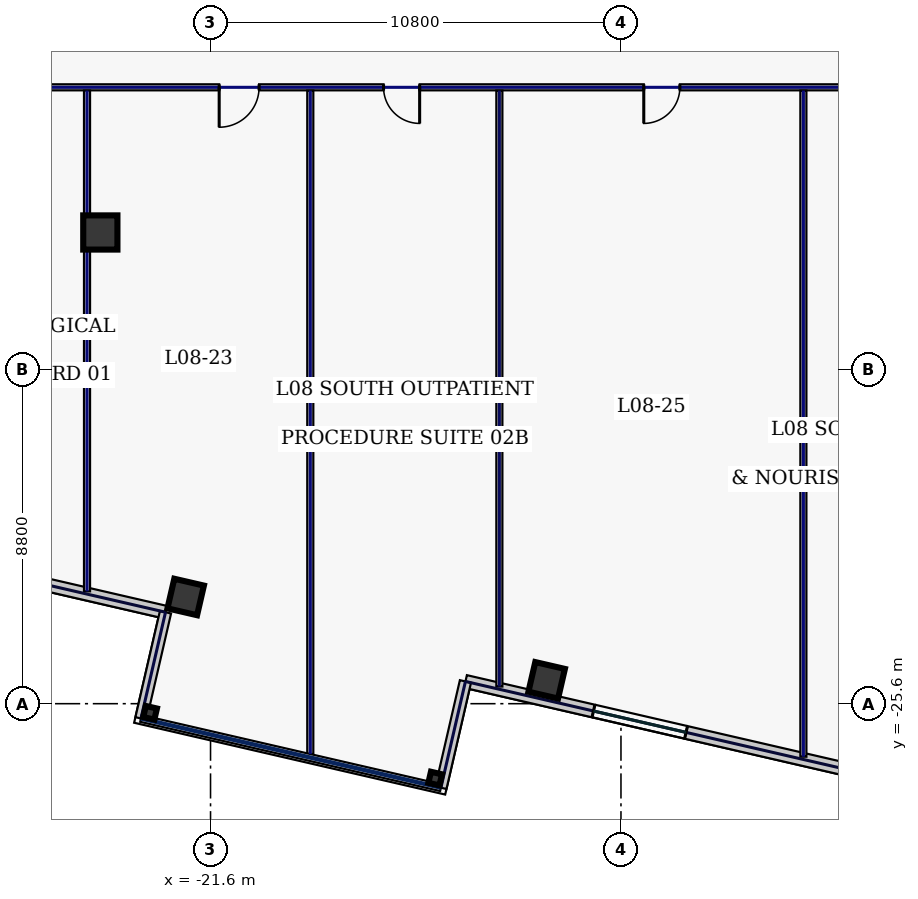
"""IFC4 building model, lengths in metres.
Left out: names, types, materials, properties, quantities, classifications, styles, units other than length and angle.
Written with IfcOpenShell. Run it as: python <this file> out.ifc"""

import sys

from ifc_helpers import new_model, si_unit, direction, frame, frame_2d, origin, origin_2d, place, context, subcontext, project, spatial, rectangle, hollow_rectangle, extrude, element, fill, save


model = new_model("IFC4")
c1 = context("Model", 3, precision=1e-05, world=origin(), true_north=direction((0.0, 1.0)))
c2 = subcontext(c1, "Body", "Model", "MODEL_VIEW")
j1 = project(units=[si_unit("LENGTHUNIT", "METRE"), si_unit("PLANEANGLEUNIT", "RADIAN")], contexts=[c1])
p1 = place(None, origin())
s1 = spatial("IfcSite", under=j1, at=p1, CompositionType="ELEMENT")
p2 = place(p1, origin())
s2 = spatial("IfcBuilding", under=s1, at=p2, CompositionType="ELEMENT")
p3 = place(p2, frame((0.0, 0.0, 43.4)))
s3 = spatial("IfcBuildingStorey", under=s2, at=p3, CompositionType="ELEMENT", Elevation=43.4)
p4 = place(p3, frame((-24.5, -13.2, 0.0), z_axis=(0.0, 0.0, 1.0), x_axis=(1.0, 0.0, 0.0)))
e1 = element("IfcColumn", 1, at=p4, inside=s3, PredefinedType="COLUMN", context=c2, shape_type="SweptSolid", body=[
    extrude(hollow_rectangle(XDim=0.9, YDim=0.9, WallThickness=0.04, at=origin_2d()), origin(), (0.0, 0.0, 1.0), 3.74),
])
for number, where, z_axis, x_axis in (
    (2, (-22.254, -22.792, 0.0), (0.0, 0.0, 1.0), (0.974, -0.225, 0.0)),
    (3, (-12.755, -24.985, 0.0), (0.0, 0.0, 1.0), (0.974, -0.225, 0.0)),
):
    element("IfcColumn", number, at=place(p3, frame(where, z_axis=z_axis, x_axis=x_axis)), inside=s3, PredefinedType="COLUMN", context=c2, shape_type="SweptSolid", body=[
        extrude(hollow_rectangle(XDim=0.8, YDim=0.8, WallThickness=0.036, at=origin_2d()), origin(), (0.0, 0.0, 1.0), 3.74),
    ])
for number, where, z_axis, x_axis in (
    (4, (-23.19, -25.839, 0.0), (0.0, 0.0, 1.0), (0.974, -0.225, 0.0)),
    (5, (-15.688, -27.571, 0.0), (0.0, 0.0, 1.0), (0.974, -0.225, 0.0)),
):
    element("IfcColumn", number, at=place(p3, frame(where, z_axis=z_axis, x_axis=x_axis)), inside=s3, PredefinedType="COLUMN", context=c2, shape_type="SweptSolid", body=[
        extrude(hollow_rectangle(XDim=0.3, YDim=0.3, WallThickness=0.016, at=origin_2d()), origin(), (0.0, 0.0, 1.0), 3.74),
    ])
p5 = place(p3, frame((-42.029, -18.75, 0.0), z_axis=(0.0, 0.0, 1.0), x_axis=(0.974371399361, -0.224945273581, 0.0)))
e6 = element("IfcWall", 6, at=p5, inside=s3, PredefinedType="STANDARD", context=c2, shape_type="SweptSolid", body=[
    extrude(rectangle(XDim=19.75, YDim=0.34, at=frame_2d((9.875, 0.0))), origin(), (0.0, 0.0, 1.0), 3.74),
])
p6 = place(p5, frame((2.062, 0.0, 0.72)))
e7 = element("IfcOpeningElement", 7, at=p6, cuts=e6, PredefinedType="OPENING", context=c2, shape_type="SweptSolid", body=[
    extrude(rectangle(XDim=2.5, YDim=2.15, at=frame_2d((1.25, 1.075))), frame((0.0, 0.18, 0.0), z_axis=(0.0, -1.0, 0.0), x_axis=(1.0, 0.0, 0.0)), (0.0, 0.0, 1.0), 0.36),
])
p7 = place(p5, frame((6.546, 0.0, 0.72)))
e8 = element("IfcOpeningElement", 8, at=p7, cuts=e6, PredefinedType="OPENING", context=c2, shape_type="SweptSolid", body=[
    extrude(rectangle(XDim=2.5, YDim=2.15, at=frame_2d((1.25, 1.075))), frame((0.0, 0.18, 0.0), z_axis=(0.0, -1.0, 0.0), x_axis=(1.0, 0.0, 0.0)), (0.0, 0.0, 1.0), 0.36),
])
p8 = place(p5, frame((13.461, 0.0, 0.72)))
e9 = element("IfcOpeningElement", 9, at=p8, cuts=e6, PredefinedType="OPENING", context=c2, shape_type="SweptSolid", body=[
    extrude(rectangle(XDim=0.85, YDim=1.85, at=frame_2d((0.425, 0.925))), frame((0.0, 0.18, 0.0), z_axis=(0.0, -1.0, 0.0), x_axis=(1.0, 0.0, 0.0)), (0.0, 0.0, 1.0), 0.36),
])
p9 = place(p3, frame((-14.892, -25.015, 0.0), z_axis=(0.0, 0.0, 1.0), x_axis=(0.974372775, -0.224939314791, 0.0)))
e10 = element("IfcWall", 10, at=p9, inside=s3, PredefinedType="STANDARD", context=c2, shape_type="SweptSolid", body=[
    extrude(rectangle(XDim=14.299, YDim=0.34, at=frame_2d((7.149, 0.0))), origin(), (0.0, 0.0, 1.0), 3.74),
])
p10 = place(p9, frame((3.458, 0.0, 0.72)))
e11 = element("IfcOpeningElement", 11, at=p10, cuts=e10, PredefinedType="OPENING", context=c2, shape_type="SweptSolid", body=[
    extrude(rectangle(XDim=2.5, YDim=2.15, at=frame_2d((1.25, 1.075))), frame((0.0, 0.18, 0.0), z_axis=(0.0, -1.0, 0.0), x_axis=(1.0, 0.0, 0.0)), (0.0, 0.0, 1.0), 0.36),
])
p11 = place(p3, frame((-22.785, -23.193, 0.0), z_axis=(0.0, 0.0, 1.0), x_axis=(-0.224983749842, -0.974362515857, 0.0)))
e12 = element("IfcWall", 12, at=p11, inside=s3, PredefinedType="STANDARD", context=c2, shape_type="SweptSolid", body=[
    extrude(rectangle(XDim=2.87, YDim=0.3, at=frame_2d((1.435, 0.0))), origin(), (0.0, 0.0, 1.0), 1.535),
])
p12 = place(p3, frame((-14.892, -25.015, 0.0), z_axis=(0.0, 0.0, 1.0), x_axis=(-0.225002397841, -0.97435820978, 0.0)))
e13 = element("IfcWall", 13, at=p12, inside=s3, PredefinedType="STANDARD", context=c2, shape_type="SweptSolid", body=[
    extrude(rectangle(XDim=2.87, YDim=0.3, at=frame_2d((1.435, 0.0))), origin(), (0.0, 0.0, 1.0), 1.535),
])
p13 = place(p3, frame((29.415, -9.38, 0.0), z_axis=(0.0, 0.0, 1.0), x_axis=(-1.0, 0.0, 0.0)))
e14 = element("IfcWall", 14, at=p13, inside=s3, PredefinedType="PARTITIONING", context=c2, shape_type="SweptSolid", body=[
    extrude(rectangle(XDim=58.83, YDim=0.16, at=frame_2d((29.415, 0.0))), origin(), (0.0, 0.0, 1.0), 3.74),
])
p14 = place(p13, frame((55.831, 0.0, 0.0)))
e15 = element("IfcOpeningElement", 15, at=p14, cuts=e14, PredefinedType="OPENING", context=c2, shape_type="SweptSolid", body=[
    extrude(rectangle(XDim=1.3, YDim=2.2, at=frame_2d((0.65, 1.1))), frame((0.0, 0.09, 0.0), z_axis=(0.0, -1.0, 0.0), x_axis=(1.0, 0.0, 0.0)), (0.0, 0.0, 1.0), 0.18),
])
p15 = place(p13, frame((49.738, 0.0, 0.0)))
e16 = element("IfcOpeningElement", 16, at=p15, cuts=e14, PredefinedType="OPENING", context=c2, shape_type="SweptSolid", body=[
    extrude(rectangle(XDim=1.05, YDim=2.2, at=frame_2d((0.525, 1.1))), frame((0.0, 0.09, 0.0), z_axis=(0.0, -1.0, 0.0), x_axis=(1.0, 0.0, 0.0)), (0.0, 0.0, 1.0), 0.18),
])
p16 = place(p13, frame((45.512, 0.0, 0.0)))
e17 = element("IfcOpeningElement", 17, at=p16, cuts=e14, PredefinedType="OPENING", context=c2, shape_type="SweptSolid", body=[
    extrude(rectangle(XDim=0.95, YDim=2.2, at=frame_2d((0.475, 1.1))), frame((0.0, 0.09, 0.0), z_axis=(0.0, -1.0, 0.0), x_axis=(1.0, 0.0, 0.0)), (0.0, 0.0, 1.0), 0.18),
])
p17 = place(p13, frame((38.665, 0.0, 0.0)))
e18 = element("IfcOpeningElement", 18, at=p17, cuts=e14, PredefinedType="OPENING", context=c2, shape_type="SweptSolid", body=[
    extrude(rectangle(XDim=0.95, YDim=2.2, at=frame_2d((0.475, 1.1))), frame((0.0, 0.09, 0.0), z_axis=(0.0, -1.0, 0.0), x_axis=(1.0, 0.0, 0.0)), (0.0, 0.0, 1.0), 0.18),
])
p18 = place(p13, frame((32.575, 0.0, 0.0)))
e19 = element("IfcOpeningElement", 19, at=p18, cuts=e14, PredefinedType="OPENING", context=c2, shape_type="SweptSolid", body=[
    extrude(rectangle(XDim=0.95, YDim=2.2, at=frame_2d((0.475, 1.1))), frame((0.0, 0.09, 0.0), z_axis=(0.0, -1.0, 0.0), x_axis=(1.0, 0.0, 0.0)), (0.0, 0.0, 1.0), 0.18),
])
p19 = place(p13, frame((28.125, 0.0, 0.0)))
e20 = element("IfcOpeningElement", 20, at=p19, cuts=e14, PredefinedType="OPENING", context=c2, shape_type="SweptSolid", body=[
    extrude(rectangle(XDim=0.95, YDim=2.2, at=frame_2d((0.475, 1.1))), frame((0.0, 0.09, 0.0), z_axis=(0.0, -1.0, 0.0), x_axis=(1.0, 0.0, 0.0)), (0.0, 0.0, 1.0), 0.18),
])
p20 = place(p13, frame((23.5, 0.0, 0.0)))
e21 = element("IfcOpeningElement", 21, at=p20, cuts=e14, PredefinedType="OPENING", context=c2, shape_type="SweptSolid", body=[
    extrude(rectangle(XDim=1.3, YDim=2.2, at=frame_2d((0.65, 1.1))), frame((0.0, 0.09, 0.0), z_axis=(0.0, -1.0, 0.0), x_axis=(1.0, 0.0, 0.0)), (0.0, 0.0, 1.0), 0.18),
])
p21 = place(p13, frame((19.05, 0.0, 0.0)))
e22 = element("IfcOpeningElement", 22, at=p21, cuts=e14, PredefinedType="OPENING", context=c2, shape_type="SweptSolid", body=[
    extrude(rectangle(XDim=1.45, YDim=2.2, at=frame_2d((0.725, 1.1))), frame((0.0, 0.09, 0.0), z_axis=(0.0, -1.0, 0.0), x_axis=(1.0, 0.0, 0.0)), (0.0, 0.0, 1.0), 0.18),
])
p22 = place(p13, frame((14.8, 0.0, 0.0)))
e23 = element("IfcOpeningElement", 23, at=p22, cuts=e14, PredefinedType="OPENING", context=c2, shape_type="SweptSolid", body=[
    extrude(rectangle(XDim=1.3, YDim=2.2, at=frame_2d((0.65, 1.1))), frame((0.0, 0.09, 0.0), z_axis=(0.0, -1.0, 0.0), x_axis=(1.0, 0.0, 0.0)), (0.0, 0.0, 1.0), 0.18),
])
p23 = place(p13, frame((10.925, 0.0, 0.0)))
e24 = element("IfcOpeningElement", 24, at=p23, cuts=e14, PredefinedType="OPENING", context=c2, shape_type="SweptSolid", body=[
    extrude(rectangle(XDim=0.95, YDim=2.2, at=frame_2d((0.475, 1.1))), frame((0.0, 0.09, 0.0), z_axis=(0.0, -1.0, 0.0), x_axis=(1.0, 0.0, 0.0)), (0.0, 0.0, 1.0), 0.18),
])
p24 = place(p13, frame((6.65, 0.0, 0.0)))
e25 = element("IfcOpeningElement", 25, at=p24, cuts=e14, PredefinedType="OPENING", context=c2, shape_type="SweptSolid", body=[
    extrude(rectangle(XDim=0.95, YDim=2.2, at=frame_2d((0.475, 1.1))), frame((0.0, 0.09, 0.0), z_axis=(0.0, -1.0, 0.0), x_axis=(1.0, 0.0, 0.0)), (0.0, 0.0, 1.0), 0.18),
])
p25 = place(p13, frame((2.044, 0.0, 0.0)))
e26 = element("IfcOpeningElement", 26, at=p25, cuts=e14, PredefinedType="OPENING", context=c2, shape_type="SweptSolid", body=[
    extrude(rectangle(XDim=1.05, YDim=2.2, at=frame_2d((0.525, 1.1))), frame((0.0, 0.09, 0.0), z_axis=(0.0, -1.0, 0.0), x_axis=(1.0, 0.0, 0.0)), (0.0, 0.0, 1.0), 0.18),
])
p26 = place(p3, frame((-24.85, -22.644, 0.0), z_axis=(0.0, 0.0, 1.0), x_axis=(0.0, 1.0, 0.0)))
e27 = element("IfcWall", 27, at=p26, inside=s3, PredefinedType="PARTITIONING", context=c2, shape_type="SweptSolid", body=[
    extrude(rectangle(XDim=13.179, YDim=0.16, at=frame_2d((6.589, 0.0))), origin(), (0.0, 0.0, 1.0), 3.74),
])
p27 = place(p3, frame((-14.0, -25.149, 0.0), z_axis=(0.0, 0.0, 1.0), x_axis=(0.0, 1.0, 0.0)))
e28 = element("IfcWall", 28, at=p27, inside=s3, PredefinedType="PARTITIONING", context=c2, shape_type="SweptSolid", body=[
    extrude(rectangle(XDim=15.684, YDim=0.16, at=frame_2d((7.842, 0.0))), origin(), (0.0, 0.0, 1.0), 1.535),
])
p28 = place(p3, frame((-6.0, -26.996, 0.0), z_axis=(0.0, 0.0, 1.0), x_axis=(0.0, 1.0, 0.0)))
e29 = element("IfcWall", 29, at=p28, inside=s3, PredefinedType="PARTITIONING", context=c2, shape_type="SweptSolid", body=[
    extrude(rectangle(XDim=17.531, YDim=0.16, at=frame_2d((8.765, 0.0))), origin(), (0.0, 0.0, 1.0), 3.74),
])
p29 = place(p3, frame((-18.975, -26.925, 0.0), z_axis=(0.0, 0.0, 1.0), x_axis=(0.0, 1.0, 0.0)))
e30 = element("IfcWall", 30, at=p29, inside=s3, PredefinedType="PARTITIONING", context=c2, shape_type="SweptSolid", body=[
    extrude(rectangle(XDim=17.46, YDim=0.16, at=frame_2d((8.73, 0.0))), origin(), (0.0, 0.0, 1.0), 3.74),
])
p30 = place(p10, origin())
e31 = element("IfcWindow", 31, at=p30, inside=s3, PartitioningType="SINGLE_PANEL", PredefinedType="WINDOW", context=c2, shape_type="SweptSolid", body=[
    extrude(rectangle(XDim=2.5, YDim=2.15, at=frame_2d((1.25, 1.075))), frame((0.0, 0.03, 0.0), z_axis=(0.0, -1.0, 0.0), x_axis=(1.0, 0.0, 0.0)), (0.0, 0.0, 1.0), 0.06),
])
fill(e11, e31)
p31 = place(p15, origin())
e32 = element("IfcDoor", 32, at=p31, inside=s3, OperationType="SINGLE_SWING_RIGHT", PredefinedType="DOOR", context=c2, shape_type="SweptSolid", body=[
    extrude(rectangle(XDim=1.05, YDim=2.2, at=frame_2d((0.525, 1.1))), frame((0.0, 0.025, 0.0), z_axis=(0.0, -1.0, 0.0), x_axis=(1.0, 0.0, 0.0)), (0.0, 0.0, 1.0), 0.05),
])
fill(e16, e32)
p32 = place(p16, origin())
e33 = element("IfcDoor", 33, at=p32, inside=s3, OperationType="SINGLE_SWING_LEFT", PredefinedType="DOOR", context=c2, shape_type="SweptSolid", body=[
    extrude(rectangle(XDim=0.95, YDim=2.2, at=frame_2d((0.475, 1.1))), frame((0.0, 0.025, 0.0), z_axis=(0.0, -1.0, 0.0), x_axis=(1.0, 0.0, 0.0)), (0.0, 0.0, 1.0), 0.05),
])
fill(e17, e33)
p33 = place(p17, origin())
e34 = element("IfcDoor", 34, at=p33, inside=s3, OperationType="SINGLE_SWING_RIGHT", PredefinedType="DOOR", context=c2, shape_type="SweptSolid", body=[
    extrude(rectangle(XDim=0.95, YDim=2.2, at=frame_2d((0.475, 1.1))), frame((0.0, 0.025, 0.0), z_axis=(0.0, -1.0, 0.0), x_axis=(1.0, 0.0, 0.0)), (0.0, 0.0, 1.0), 0.05),
])
fill(e18, e34)
save(model, sys.argv[1])
